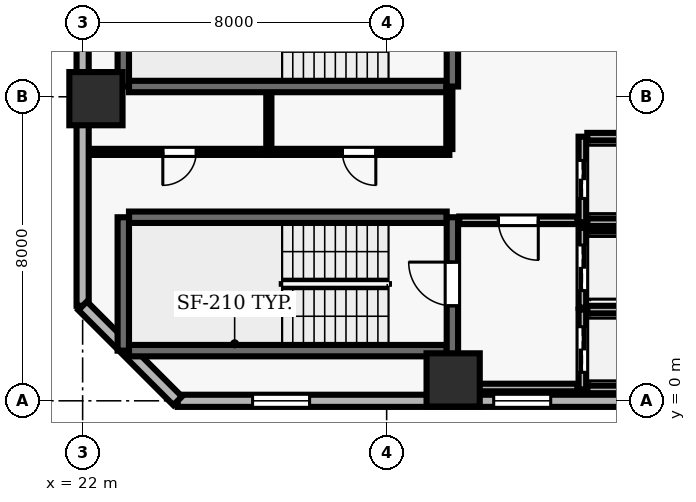
"""IFC4 building model, lengths in metres.
Left out: names, types, materials, properties, quantities, classifications, styles, units other than length and angle.
Written with IfcOpenShell. Run it as: python <this file> out.ifc"""

import sys

from ifc_helpers import new_model, si_unit, direction, frame, frame_2d, origin, origin_2d, place, context, subcontext, project, spatial, rectangle, extrude, element, fill, save


model = new_model("IFC4")
c1 = context("Model", 3, precision=1e-05, world=origin(), true_north=direction((0.0, 1.0)))
c2 = subcontext(c1, "Body", "Model", "MODEL_VIEW")
j1 = project(units=[si_unit("LENGTHUNIT", "METRE"), si_unit("PLANEANGLEUNIT", "RADIAN")], contexts=[c1])
p1 = place(None, origin())
s1 = spatial("IfcSite", under=j1, at=p1, CompositionType="ELEMENT")
p2 = place(p1, origin())
s2 = spatial("IfcBuilding", under=s1, at=p2, CompositionType="ELEMENT")
p3 = place(p2, frame((0.0, 0.0, 73.9)))
s3 = spatial("IfcBuildingStorey", under=s2, at=p3, CompositionType="ELEMENT", Elevation=73.9)
for number, where, z_axis, x_axis in (
    (1, (31.75, 0.55, 0.0), (0.0, 0.0, 1.0), (1.0, 0.0, 0.0)),
    (2, (22.35, 7.95, 0.0), (0.0, 0.0, 1.0), (1.0, 0.0, 0.0)),
):
    element("IfcColumn", number, at=place(p3, frame(where, z_axis=z_axis, x_axis=x_axis)), inside=s3, PredefinedType="COLUMN", context=c2, shape_type="SweptSolid", body=[
        extrude(rectangle(XDim=1.4, YDim=1.4, at=origin_2d()), origin(), (0.0, 0.0, 1.0), 3.9),
    ])
p4 = place(p3, frame((24.5, 0.0, 0.0), z_axis=(0.0, 0.0, 1.0), x_axis=(1.0, 0.0, 0.0)))
e3 = element("IfcWall", 3, at=p4, inside=s3, PredefinedType="SOLIDWALL", context=c2, shape_type="SweptSolid", body=[
    extrude(rectangle(XDim=49.0, YDim=0.32, at=frame_2d((24.5, 0.0))), origin(), (0.0, 0.0, 1.0), 3.69),
])
p5 = place(p4, frame((1.972, 0.0, 0.9)))
e4 = element("IfcOpeningElement", 4, at=p5, cuts=e3, PredefinedType="OPENING", context=c2, shape_type="SweptSolid", body=[
    extrude(rectangle(XDim=1.5, YDim=1.8, at=frame_2d((0.75, 0.9))), frame((0.0, 0.17, 0.0), z_axis=(0.0, -1.0, 0.0), x_axis=(1.0, 0.0, 0.0)), (0.0, 0.0, 1.0), 0.34),
])
p6 = place(p4, frame((8.317, 0.0, 0.9)))
e5 = element("IfcOpeningElement", 5, at=p6, cuts=e3, PredefinedType="OPENING", context=c2, shape_type="SweptSolid", body=[
    extrude(rectangle(XDim=1.5, YDim=1.8, at=frame_2d((0.75, 0.9))), frame((0.0, 0.17, 0.0), z_axis=(0.0, -1.0, 0.0), x_axis=(1.0, 0.0, 0.0)), (0.0, 0.0, 1.0), 0.34),
])
p7 = place(p4, frame((18.306, 0.0, 0.9)))
e6 = element("IfcOpeningElement", 6, at=p7, cuts=e3, PredefinedType="OPENING", context=c2, shape_type="SweptSolid", body=[
    extrude(rectangle(XDim=1.5, YDim=1.8, at=frame_2d((0.75, 0.9))), frame((0.0, 0.17, 0.0), z_axis=(0.0, -1.0, 0.0), x_axis=(1.0, 0.0, 0.0)), (0.0, 0.0, 1.0), 0.34),
])
p8 = place(p4, frame((23.75, 0.0, 0.9)))
e7 = element("IfcOpeningElement", 7, at=p8, cuts=e3, PredefinedType="OPENING", context=c2, shape_type="SweptSolid", body=[
    extrude(rectangle(XDim=1.5, YDim=1.8, at=frame_2d((0.75, 0.9))), frame((0.0, 0.17, 0.0), z_axis=(0.0, -1.0, 0.0), x_axis=(1.0, 0.0, 0.0)), (0.0, 0.0, 1.0), 0.34),
])
p9 = place(p4, frame((29.644, 0.0, 0.9)))
e8 = element("IfcOpeningElement", 8, at=p9, cuts=e3, PredefinedType="OPENING", context=c2, shape_type="SweptSolid", body=[
    extrude(rectangle(XDim=1.5, YDim=1.8, at=frame_2d((0.75, 0.9))), frame((0.0, 0.17, 0.0), z_axis=(0.0, -1.0, 0.0), x_axis=(1.0, 0.0, 0.0)), (0.0, 0.0, 1.0), 0.34),
])
p10 = place(p4, frame((34.639, 0.0, 0.9)))
e9 = element("IfcOpeningElement", 9, at=p10, cuts=e3, PredefinedType="OPENING", context=c2, shape_type="SweptSolid", body=[
    extrude(rectangle(XDim=1.5, YDim=1.8, at=frame_2d((0.75, 0.9))), frame((0.0, 0.17, 0.0), z_axis=(0.0, -1.0, 0.0), x_axis=(1.0, 0.0, 0.0)), (0.0, 0.0, 1.0), 0.34),
])
p11 = place(p4, frame((45.528, 0.0, 0.9)))
e10 = element("IfcOpeningElement", 10, at=p11, cuts=e3, PredefinedType="OPENING", context=c2, shape_type="SweptSolid", body=[
    extrude(rectangle(XDim=1.5, YDim=1.8, at=frame_2d((0.75, 0.9))), frame((0.0, 0.17, 0.0), z_axis=(0.0, -1.0, 0.0), x_axis=(1.0, 0.0, 0.0)), (0.0, 0.0, 1.0), 0.34),
])
p12 = place(p3, frame((22.0, 51.5, 0.0), z_axis=(0.0, 0.0, 1.0), x_axis=(0.0, -1.0, 0.0)))
e11 = element("IfcWall", 11, at=p12, inside=s3, PredefinedType="SOLIDWALL", context=c2, shape_type="SweptSolid", body=[
    extrude(rectangle(XDim=49.0, YDim=0.32, at=frame_2d((24.5, 0.0))), origin(), (0.0, 0.0, 1.0), 3.69),
])
p13 = place(p12, frame((12.1, 0.0, 0.0)))
e12 = element("IfcOpeningElement", 12, at=p13, cuts=e11, PredefinedType="OPENING", context=c2, shape_type="SweptSolid", body=[
    extrude(rectangle(XDim=1.0, YDim=2.2, at=frame_2d((0.5, 1.1))), frame((0.0, 0.17, 0.0), z_axis=(0.0, -1.0, 0.0), x_axis=(1.0, 0.0, 0.0)), (0.0, 0.0, 1.0), 0.34),
])
p14 = place(p12, frame((1.972, 0.0, 0.9)))
e13 = element("IfcOpeningElement", 13, at=p14, cuts=e11, PredefinedType="OPENING", context=c2, shape_type="SweptSolid", body=[
    extrude(rectangle(XDim=1.5, YDim=1.8, at=frame_2d((0.75, 0.9))), frame((0.0, 0.17, 0.0), z_axis=(0.0, -1.0, 0.0), x_axis=(1.0, 0.0, 0.0)), (0.0, 0.0, 1.0), 0.34),
])
p15 = place(p12, frame((7.417, 0.0, 0.9)))
e14 = element("IfcOpeningElement", 14, at=p15, cuts=e11, PredefinedType="OPENING", context=c2, shape_type="SweptSolid", body=[
    extrude(rectangle(XDim=1.5, YDim=1.8, at=frame_2d((0.75, 0.9))), frame((0.0, 0.17, 0.0), z_axis=(0.0, -1.0, 0.0), x_axis=(1.0, 0.0, 0.0)), (0.0, 0.0, 1.0), 0.34),
])
p16 = place(p12, frame((18.306, 0.0, 0.9)))
e15 = element("IfcOpeningElement", 15, at=p16, cuts=e11, PredefinedType="OPENING", context=c2, shape_type="SweptSolid", body=[
    extrude(rectangle(XDim=1.5, YDim=1.8, at=frame_2d((0.75, 0.9))), frame((0.0, 0.17, 0.0), z_axis=(0.0, -1.0, 0.0), x_axis=(1.0, 0.0, 0.0)), (0.0, 0.0, 1.0), 0.34),
])
p17 = place(p12, frame((23.3, 0.0, 0.9)))
e16 = element("IfcOpeningElement", 16, at=p17, cuts=e11, PredefinedType="OPENING", context=c2, shape_type="SweptSolid", body=[
    extrude(rectangle(XDim=1.5, YDim=1.8, at=frame_2d((0.75, 0.9))), frame((0.0, 0.17, 0.0), z_axis=(0.0, -1.0, 0.0), x_axis=(1.0, 0.0, 0.0)), (0.0, 0.0, 1.0), 0.34),
])
p18 = place(p12, frame((29.194, 0.0, 0.9)))
e17 = element("IfcOpeningElement", 17, at=p18, cuts=e11, PredefinedType="OPENING", context=c2, shape_type="SweptSolid", body=[
    extrude(rectangle(XDim=1.5, YDim=1.8, at=frame_2d((0.75, 0.9))), frame((0.0, 0.17, 0.0), z_axis=(0.0, -1.0, 0.0), x_axis=(1.0, 0.0, 0.0)), (0.0, 0.0, 1.0), 0.34),
])
p19 = place(p12, frame((34.189, 0.0, 0.9)))
e18 = element("IfcOpeningElement", 18, at=p19, cuts=e11, PredefinedType="OPENING", context=c2, shape_type="SweptSolid", body=[
    extrude(rectangle(XDim=1.5, YDim=1.8, at=frame_2d((0.75, 0.9))), frame((0.0, 0.17, 0.0), z_axis=(0.0, -1.0, 0.0), x_axis=(1.0, 0.0, 0.0)), (0.0, 0.0, 1.0), 0.34),
])
p20 = place(p12, frame((40.083, 0.0, 0.9)))
e19 = element("IfcOpeningElement", 19, at=p20, cuts=e11, PredefinedType="OPENING", context=c2, shape_type="SweptSolid", body=[
    extrude(rectangle(XDim=1.5, YDim=1.8, at=frame_2d((0.75, 0.9))), frame((0.0, 0.17, 0.0), z_axis=(0.0, -1.0, 0.0), x_axis=(1.0, 0.0, 0.0)), (0.0, 0.0, 1.0), 0.34),
])
p21 = place(p3, frame((22.0, 2.5, 0.0), z_axis=(0.0, 0.0, 1.0), x_axis=(0.707106781187, -0.707106781187, 0.0)))
e20 = element("IfcWall", 20, at=p21, inside=s3, PredefinedType="SOLIDWALL", context=c2, shape_type="SweptSolid", body=[
    extrude(rectangle(XDim=3.536, YDim=0.32, at=frame_2d((1.768, 0.0))), origin(), (0.0, 0.0, 1.0), 3.69),
])
p22 = place(p3, frame((31.58, 4.83, 0.0), z_axis=(0.0, 0.0, 1.0), x_axis=(-1.0, 0.0, 0.0)))
e21 = element("IfcWall", 21, at=p22, inside=s3, PredefinedType="SHEAR", context=c2, shape_type="SweptSolid", body=[
    extrude(rectangle(XDim=8.36, YDim=0.3, at=frame_2d((4.18, 0.0))), origin(), (0.0, 0.0, 1.0), 3.69),
])
p23 = place(p3, frame((23.07, 4.83, 0.0), z_axis=(0.0, 0.0, 1.0), x_axis=(0.0, -1.0, 0.0)))
e22 = element("IfcWall", 22, at=p23, inside=s3, PredefinedType="SHEAR", context=c2, shape_type="SweptSolid", body=[
    extrude(rectangle(XDim=3.51, YDim=0.3, at=frame_2d((1.755, 0.0))), origin(), (0.0, 0.0, 1.0), 3.69),
])
p24 = place(p3, frame((23.22, 1.32, 0.0), z_axis=(0.0, 0.0, 1.0), x_axis=(1.0, 0.0, 0.0)))
e23 = element("IfcWall", 23, at=p24, inside=s3, PredefinedType="SHEAR", context=c2, shape_type="SweptSolid", body=[
    extrude(rectangle(XDim=8.36, YDim=0.3, at=frame_2d((4.18, 0.0))), origin(), (0.0, 0.0, 1.0), 3.69),
])
p25 = place(p3, frame((31.73, 0.96, 0.0), z_axis=(0.0, 0.0, 1.0), x_axis=(0.0, 1.0, 0.0)))
e24 = element("IfcWall", 24, at=p25, inside=s3, PredefinedType="SHEAR", context=c2, shape_type="SweptSolid", body=[
    extrude(rectangle(XDim=3.87, YDim=0.3, at=frame_2d((1.935, 0.0))), origin(), (0.0, 0.0, 1.0), 3.69),
])
p26 = place(p25, frame((1.54, 0.0, 0.0)))
e25 = element("IfcOpeningElement", 25, at=p26, cuts=e24, PredefinedType="OPENING", context=c2, shape_type="SweptSolid", body=[
    extrude(rectangle(XDim=1.15, YDim=2.15, at=frame_2d((0.575, 1.075))), frame((0.0, 0.16, 0.0), z_axis=(0.0, -1.0, 0.0), x_axis=(1.0, 0.0, 0.0)), (0.0, 0.0, 1.0), 0.32),
])
p27 = place(p3, frame((23.07, 11.78, 0.0), z_axis=(0.0, 0.0, 1.0), x_axis=(0.0, -1.0, 0.0)))
e26 = element("IfcWall", 26, at=p27, inside=s3, PredefinedType="SHEAR", context=c2, shape_type="SweptSolid", body=[
    extrude(rectangle(XDim=3.51, YDim=0.3, at=frame_2d((1.755, 0.0))), origin(), (0.0, 0.0, 1.0), 3.69),
])
p28 = place(p3, frame((23.22, 8.27, 0.0), z_axis=(0.0, 0.0, 1.0), x_axis=(1.0, 0.0, 0.0)))
e27 = element("IfcWall", 27, at=p28, inside=s3, PredefinedType="SHEAR", context=c2, shape_type="SweptSolid", body=[
    extrude(rectangle(XDim=8.36, YDim=0.3, at=frame_2d((4.18, 0.0))), origin(), (0.0, 0.0, 1.0), 3.69),
])
p29 = place(p3, frame((31.73, 8.27, 0.0), z_axis=(0.0, 0.0, 1.0), x_axis=(0.0, 1.0, 0.0)))
e28 = element("IfcWall", 28, at=p29, inside=s3, PredefinedType="SHEAR", context=c2, shape_type="SweptSolid", body=[
    extrude(rectangle(XDim=3.51, YDim=0.3, at=frame_2d((1.755, 0.0))), origin(), (0.0, 0.0, 1.0), 3.69),
])
p30 = place(p29, frame((1.18, 0.0, 0.0)))
e29 = element("IfcOpeningElement", 29, at=p30, cuts=e28, PredefinedType="OPENING", context=c2, shape_type="SweptSolid", body=[
    extrude(rectangle(XDim=1.15, YDim=2.15, at=frame_2d((0.575, 1.075))), frame((0.0, 0.16, 0.0), z_axis=(0.0, -1.0, 0.0), x_axis=(1.0, 0.0, 0.0)), (0.0, 0.0, 1.0), 0.32),
])
p31 = place(p3, frame((35.15, 2.4, 0.0), z_axis=(0.0, 0.0, 1.0), x_axis=(0.0, -1.0, 0.0)))
e30 = element("IfcWall", 30, at=p31, inside=s3, PredefinedType="SOLIDWALL", context=c2, shape_type="SweptSolid", body=[
    extrude(rectangle(XDim=2.1, YDim=0.2, at=frame_2d((1.05, 0.0))), origin(), (0.0, 0.0, 1.0), 3.69),
])
p32 = place(p31, frame((0.45, 0.0, 0.0)))
e31 = element("IfcOpeningElement", 31, at=p32, cuts=e30, PredefinedType="OPENING", context=c2, shape_type="SweptSolid", body=[
    extrude(rectangle(XDim=1.2, YDim=2.15, at=frame_2d((0.6, 1.075))), frame((0.0, 0.11, 0.0), z_axis=(0.0, -1.0, 0.0), x_axis=(1.0, 0.0, 0.0)), (0.0, 0.0, 1.0), 0.22),
])
for number, where, z_axis, x_axis in (
    (32, (35.28, 0.3, 0.0), (0.0, 0.0, 1.0), (1.0, 0.0, 0.0)),
    (33, (37.42, 2.4, 0.0), (0.0, 0.0, 1.0), (-1.0, 0.0, 0.0)),
):
    element("IfcWall", number, at=place(p3, frame(where, z_axis=z_axis, x_axis=x_axis)), inside=s3, PredefinedType="SOLIDWALL", context=c2, shape_type="SweptSolid", body=[
        extrude(rectangle(XDim=2.14, YDim=0.2, at=frame_2d((1.07, 0.0))), origin(), (0.0, 0.0, 1.0), 3.69),
    ])
p33 = place(p3, frame((35.15, 4.55, 0.0), z_axis=(0.0, 0.0, 1.0), x_axis=(0.0, -1.0, 0.0)))
e34 = element("IfcWall", 34, at=p33, inside=s3, PredefinedType="SOLIDWALL", context=c2, shape_type="SweptSolid", body=[
    extrude(rectangle(XDim=2.1, YDim=0.2, at=frame_2d((1.05, 0.0))), origin(), (0.0, 0.0, 1.0), 3.69),
])
p34 = place(p33, frame((0.45, 0.0, 0.0)))
e35 = element("IfcOpeningElement", 35, at=p34, cuts=e34, PredefinedType="OPENING", context=c2, shape_type="SweptSolid", body=[
    extrude(rectangle(XDim=1.2, YDim=2.15, at=frame_2d((0.6, 1.075))), frame((0.0, 0.11, 0.0), z_axis=(0.0, -1.0, 0.0), x_axis=(1.0, 0.0, 0.0)), (0.0, 0.0, 1.0), 0.22),
])
p35 = place(p3, frame((37.42, 4.55, 0.0), z_axis=(0.0, 0.0, 1.0), x_axis=(-1.0, 0.0, 0.0)))
e36 = element("IfcWall", 36, at=p35, inside=s3, PredefinedType="SOLIDWALL", context=c2, shape_type="SweptSolid", body=[
    extrude(rectangle(XDim=2.14, YDim=0.2, at=frame_2d((1.07, 0.0))), origin(), (0.0, 0.0, 1.0), 3.69),
])
p36 = place(p3, frame((35.15, 6.95, 0.0), z_axis=(0.0, 0.0, 1.0), x_axis=(0.0, -1.0, 0.0)))
e37 = element("IfcWall", 37, at=p36, inside=s3, PredefinedType="SOLIDWALL", context=c2, shape_type="SweptSolid", body=[
    extrude(rectangle(XDim=2.25, YDim=0.2, at=frame_2d((1.125, 0.0))), origin(), (0.0, 0.0, 1.0), 3.69),
])
p37 = place(p36, frame((0.625, 0.0, 0.0)))
e38 = element("IfcOpeningElement", 38, at=p37, cuts=e37, PredefinedType="OPENING", context=c2, shape_type="SweptSolid", body=[
    extrude(rectangle(XDim=1.0, YDim=2.1, at=frame_2d((0.5, 1.05))), frame((0.0, 0.11, 0.0), z_axis=(0.0, -1.0, 0.0), x_axis=(1.0, 0.0, 0.0)), (0.0, 0.0, 1.0), 0.22),
])
for number, where, z_axis, x_axis in (
    (39, (35.28, 4.7, 0.0), (0.0, 0.0, 1.0), (1.0, 0.0, 0.0)),
    (40, (37.42, 6.95, 0.0), (0.0, 0.0, 1.0), (-1.0, 0.0, 0.0)),
):
    element("IfcWall", number, at=place(p3, frame(where, z_axis=z_axis, x_axis=x_axis)), inside=s3, PredefinedType="SOLIDWALL", context=c2, shape_type="SweptSolid", body=[
        extrude(rectangle(XDim=2.14, YDim=0.2, at=frame_2d((1.07, 0.0))), origin(), (0.0, 0.0, 1.0), 3.69),
    ])
p38 = place(p3, frame((26.9, 6.55, 0.0), z_axis=(0.0, 0.0, 1.0), x_axis=(-1.0, 0.0, 0.0)))
e41 = element("IfcWall", 41, at=p38, inside=s3, PredefinedType="PARTITIONING", context=c2, shape_type="SweptSolid", body=[
    extrude(rectangle(XDim=4.7, YDim=0.16, at=frame_2d((2.35, 0.0))), origin(), (0.0, 0.0, 1.0), 3.69),
])
p39 = place(p38, frame((1.91, 0.0, 0.0)))
e42 = element("IfcOpeningElement", 42, at=p39, cuts=e41, PredefinedType="OPENING", context=c2, shape_type="SweptSolid", body=[
    extrude(rectangle(XDim=0.88, YDim=2.1, at=frame_2d((0.44, 1.05))), frame((0.0, 0.09, 0.0), z_axis=(0.0, -1.0, 0.0), x_axis=(1.0, 0.0, 0.0)), (0.0, 0.0, 1.0), 0.18),
])
p40 = place(p3, frame((31.65, 0.35, 0.0), z_axis=(0.0, 0.0, 1.0), x_axis=(1.0, 0.0, 0.0)))
e43 = element("IfcWall", 43, at=p40, inside=s3, PredefinedType="SOLIDWALL", context=c2, shape_type="SweptSolid", body=[
    extrude(rectangle(XDim=3.37, YDim=0.2, at=frame_2d((1.685, 0.0))), origin(), (0.0, 0.0, 1.0), 3.69),
])
p41 = place(p3, frame((31.65, 6.55, 0.0), z_axis=(0.0, 0.0, 1.0), x_axis=(-1.0, 0.0, 0.0)))
e44 = element("IfcWall", 44, at=p41, inside=s3, PredefinedType="PARTITIONING", context=c2, shape_type="SweptSolid", body=[
    extrude(rectangle(XDim=4.75, YDim=0.16, at=frame_2d((2.375, 0.0))), origin(), (0.0, 0.0, 1.0), 3.69),
])
p42 = place(p41, frame((1.935, 0.0, 0.0)))
e45 = element("IfcOpeningElement", 45, at=p42, cuts=e44, PredefinedType="OPENING", context=c2, shape_type="SweptSolid", body=[
    extrude(rectangle(XDim=0.88, YDim=2.1, at=frame_2d((0.44, 1.05))), frame((0.0, 0.09, 0.0), z_axis=(0.0, -1.0, 0.0), x_axis=(1.0, 0.0, 0.0)), (0.0, 0.0, 1.0), 0.18),
])
p43 = place(p3, frame((35.02, 4.75, 0.0), z_axis=(0.0, 0.0, 1.0), x_axis=(-1.0, 0.0, 0.0)))
e46 = element("IfcWall", 46, at=p43, inside=s3, PredefinedType="SOLIDWALL", context=c2, shape_type="SweptSolid", body=[
    extrude(rectangle(XDim=3.11, YDim=0.2, at=frame_2d((1.555, 0.0))), origin(), (0.0, 0.0, 1.0), 3.69),
])
p44 = place(p43, frame((1.03, 0.0, 0.0)))
e47 = element("IfcOpeningElement", 47, at=p44, cuts=e46, PredefinedType="OPENING", context=c2, shape_type="SweptSolid", body=[
    extrude(rectangle(XDim=1.05, YDim=2.15, at=frame_2d((0.525, 1.075))), frame((0.0, 0.11, 0.0), z_axis=(0.0, -1.0, 0.0), x_axis=(1.0, 0.0, 0.0)), (0.0, 0.0, 1.0), 0.22),
])
p45 = place(p3, frame((26.9, 6.625, 0.0), z_axis=(0.0, 0.0, 1.0), x_axis=(0.0, 1.0, 0.0)))
e48 = element("IfcWall", 48, at=p45, inside=s3, PredefinedType="PARTITIONING", context=c2, shape_type="SweptSolid", body=[
    extrude(rectangle(XDim=1.465, YDim=0.135, at=frame_2d((0.732, 0.0))), origin(), (0.0, 0.0, 1.0), 3.69),
])
p46 = place(p3, frame((31.65, 8.24, 0.0), z_axis=(0.0, 0.0, 1.0), x_axis=(0.0, -1.0, 0.0)))
e49 = element("IfcWall", 49, at=p46, inside=s3, PredefinedType="PARTITIONING", context=c2, shape_type="SweptSolid", body=[
    extrude(rectangle(XDim=1.615, YDim=0.16, at=frame_2d((0.808, 0.0))), origin(), (0.0, 0.0, 1.0), 3.69),
])
p47 = place(p5, origin())
e50 = element("IfcWindow", 50, at=p47, inside=s3, PartitioningType="SINGLE_PANEL", PredefinedType="WINDOW", context=c2, shape_type="SweptSolid", body=[
    extrude(rectangle(XDim=1.5, YDim=1.8, at=frame_2d((0.75, 0.9))), frame((0.0, 0.03, 0.0), z_axis=(0.0, -1.0, 0.0), x_axis=(1.0, 0.0, 0.0)), (0.0, 0.0, 1.0), 0.06),
])
fill(e4, e50)
p48 = place(p6, origin())
e51 = element("IfcWindow", 51, at=p48, inside=s3, PartitioningType="SINGLE_PANEL", PredefinedType="WINDOW", context=c2, shape_type="SweptSolid", body=[
    extrude(rectangle(XDim=1.5, YDim=1.8, at=frame_2d((0.75, 0.9))), frame((0.0, 0.03, 0.0), z_axis=(0.0, -1.0, 0.0), x_axis=(1.0, 0.0, 0.0)), (0.0, 0.0, 1.0), 0.06),
])
fill(e5, e51)
p49 = place(p26, origin())
e52 = element("IfcDoor", 52, at=p49, inside=s3, OperationType="SINGLE_SWING_RIGHT", PredefinedType="DOOR", context=c2, shape_type="SweptSolid", body=[
    extrude(rectangle(XDim=1.15, YDim=2.15, at=frame_2d((0.575, 1.075))), frame((0.0, 0.025, 0.0), z_axis=(0.0, -1.0, 0.0), x_axis=(1.0, 0.0, 0.0)), (0.0, 0.0, 1.0), 0.05),
])
fill(e25, e52)
p50 = place(p32, origin())
e53 = element("IfcDoor", 53, at=p50, inside=s3, OperationType="DOUBLE_DOOR_SLIDING", PredefinedType="DOOR", context=c2, shape_type="SweptSolid", body=[
    extrude(rectangle(XDim=1.2, YDim=2.15, at=frame_2d((0.6, 1.075))), frame((0.0, 0.025, 0.0), z_axis=(0.0, -1.0, 0.0), x_axis=(1.0, 0.0, 0.0)), (0.0, 0.0, 1.0), 0.05),
])
fill(e31, e53)
p51 = place(p34, origin())
e54 = element("IfcDoor", 54, at=p51, inside=s3, OperationType="DOUBLE_DOOR_SLIDING", PredefinedType="DOOR", context=c2, shape_type="SweptSolid", body=[
    extrude(rectangle(XDim=1.2, YDim=2.15, at=frame_2d((0.6, 1.075))), frame((0.0, 0.025, 0.0), z_axis=(0.0, -1.0, 0.0), x_axis=(1.0, 0.0, 0.0)), (0.0, 0.0, 1.0), 0.05),
])
fill(e35, e54)
p52 = place(p37, origin())
e55 = element("IfcDoor", 55, at=p52, inside=s3, OperationType="DOUBLE_DOOR_SLIDING", PredefinedType="DOOR", context=c2, shape_type="SweptSolid", body=[
    extrude(rectangle(XDim=1.0, YDim=2.1, at=frame_2d((0.5, 1.05))), frame((0.0, 0.025, 0.0), z_axis=(0.0, -1.0, 0.0), x_axis=(1.0, 0.0, 0.0)), (0.0, 0.0, 1.0), 0.05),
])
fill(e38, e55)
p53 = place(p44, origin())
e56 = element("IfcDoor", 56, at=p53, inside=s3, OperationType="SINGLE_SWING_LEFT", PredefinedType="DOOR", context=c2, shape_type="SweptSolid", body=[
    extrude(rectangle(XDim=1.05, YDim=2.15, at=frame_2d((0.525, 1.075))), frame((0.0, 0.025, 0.0), z_axis=(0.0, -1.0, 0.0), x_axis=(1.0, 0.0, 0.0)), (0.0, 0.0, 1.0), 0.05),
])
fill(e47, e56)
p54 = place(p39, origin())
e57 = element("IfcDoor", 57, at=p54, inside=s3, OperationType="SINGLE_SWING_RIGHT", PredefinedType="DOOR", context=c2, shape_type="SweptSolid", body=[
    extrude(rectangle(XDim=0.88, YDim=2.1, at=frame_2d((0.44, 1.05))), frame((0.0, 0.025, 0.0), z_axis=(0.0, -1.0, 0.0), x_axis=(1.0, 0.0, 0.0)), (0.0, 0.0, 1.0), 0.05),
])
fill(e42, e57)
p55 = place(p42, origin())
e58 = element("IfcDoor", 58, at=p55, inside=s3, OperationType="SINGLE_SWING_LEFT", PredefinedType="DOOR", context=c2, shape_type="SweptSolid", body=[
    extrude(rectangle(XDim=0.88, YDim=2.1, at=frame_2d((0.44, 1.05))), frame((0.0, 0.025, 0.0), z_axis=(0.0, -1.0, 0.0), x_axis=(1.0, 0.0, 0.0)), (0.0, 0.0, 1.0), 0.05),
])
fill(e45, e58)
save(model, sys.argv[1])
